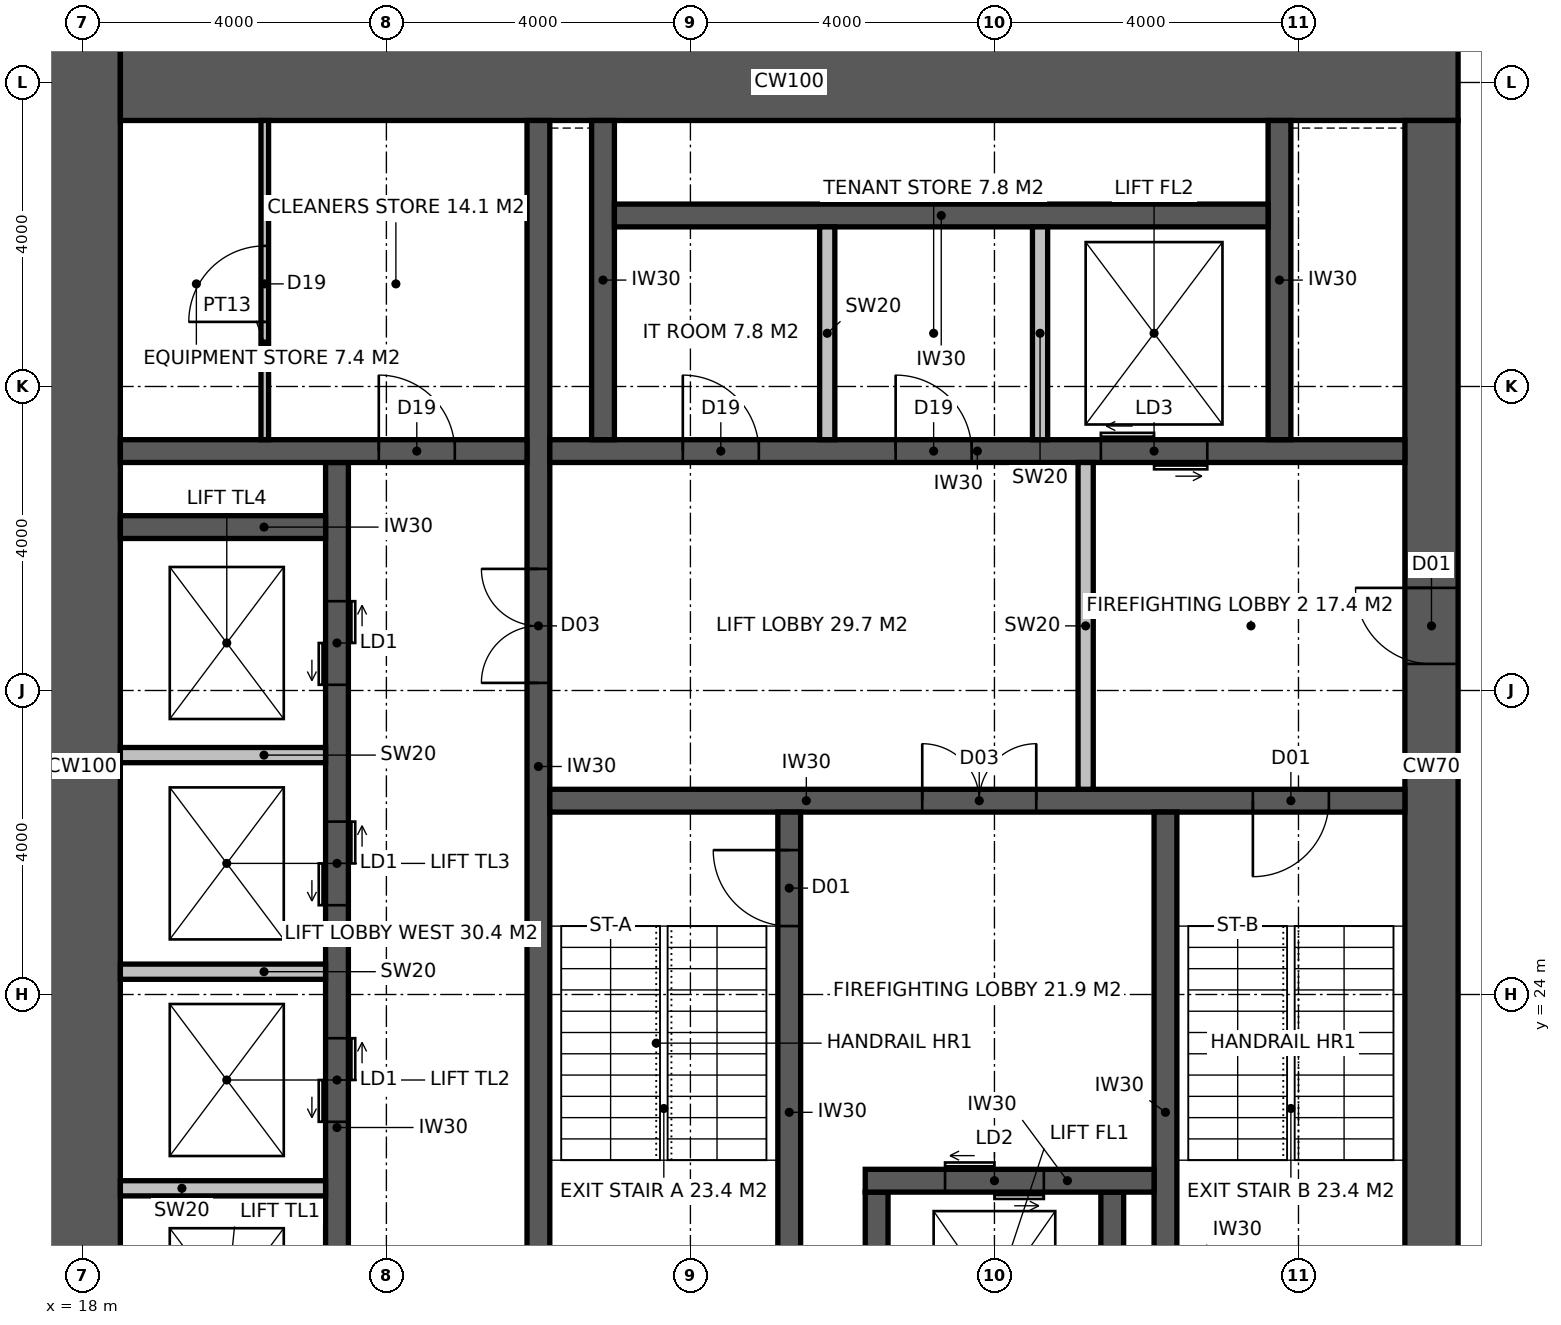
"""IFC4 building model, lengths in metres.
Left out: names, types, materials, properties, quantities, classifications, styles, units other than length and angle.
Written with IfcOpenShell. Run it as: python <this file> out.ifc"""

import sys

from ifc_helpers import new_model, si_unit, direction, frame, frame_2d, origin, place, context, subcontext, project, spatial, rectangle, extrude, element, fill, save


model = new_model("IFC4")
c1 = context("Model", 3, precision=1e-05, world=origin(), true_north=direction((0.0, 1.0)))
c2 = subcontext(c1, "Body", "Model", "MODEL_VIEW")
j1 = project(units=[si_unit("LENGTHUNIT", "METRE"), si_unit("PLANEANGLEUNIT", "RADIAN")], contexts=[c1])
p1 = place(None, origin())
s1 = spatial("IfcSite", under=j1, at=p1, CompositionType="ELEMENT")
p2 = place(p1, origin())
s2 = spatial("IfcBuilding", under=s1, at=p2, CompositionType="ELEMENT")
p3 = place(p2, frame((0.0, 0.0, 226.2)))
s3 = spatial("IfcBuildingStorey", under=s2, at=p3, CompositionType="ELEMENT", Elevation=226.2)
p4 = place(p3, frame((18.0, 17.5, -0.15), z_axis=(0.0, 0.0, 1.0), x_axis=(0.0, 1.0, 0.0)))
e1 = element("IfcWall", 1, at=p4, inside=s3, PredefinedType="SHEAR", context=c2, shape_type="SweptSolid", body=[
    extrude(rectangle(XDim=19.0, YDim=1.0, at=frame_2d((9.5, 0.0))), origin(), (0.0, 0.0, 1.0), 4.0),
])
p5 = place(p3, frame((18.5, 36.0, -0.15), z_axis=(0.0, 0.0, 1.0), x_axis=(1.0, 0.0, 0.0)))
e2 = element("IfcWall", 2, at=p5, inside=s3, PredefinedType="SHEAR", context=c2, shape_type="SweptSolid", body=[
    extrude(rectangle(XDim=17.6, YDim=1.0, at=frame_2d((8.8, 0.0))), origin(), (0.0, 0.0, 1.0), 4.0),
])
p6 = place(p3, frame((35.75, 18.5, -0.15), z_axis=(0.0, 0.0, 1.0), x_axis=(0.0, 1.0, 0.0)))
e3 = element("IfcWall", 3, at=p6, inside=s3, PredefinedType="SHEAR", context=c2, shape_type="SweptSolid", body=[
    extrude(rectangle(XDim=17.0, YDim=0.7, at=frame_2d((8.5, 0.0))), origin(), (0.0, 0.0, 1.0), 4.0),
])
p7 = place(p6, frame((9.85, 0.0, 0.15)))
e4 = element("IfcOpeningElement", 4, at=p7, cuts=e3, PredefinedType="OPENING", context=c2, shape_type="SweptSolid", body=[
    extrude(rectangle(XDim=1.0, YDim=2.2, at=frame_2d((0.5, 1.1))), frame((0.0, 0.36, 0.0), z_axis=(0.0, -1.0, 0.0), x_axis=(1.0, 0.0, 0.0)), (0.0, 0.0, 1.0), 0.72),
])
p8 = place(p3, frame((24.0, 18.5, -0.15), z_axis=(0.0, 0.0, 1.0), x_axis=(0.0, 1.0, 0.0)))
e5 = element("IfcWall", 5, at=p8, inside=s3, PredefinedType="SHEAR", context=c2, shape_type="SweptSolid", body=[
    extrude(rectangle(XDim=17.0, YDim=0.3, at=frame_2d((8.5, 0.0))), origin(), (0.0, 0.0, 1.0), 4.0),
])
p9 = place(p8, frame((9.6, 0.0, 0.15)))
e6 = element("IfcOpeningElement", 6, at=p9, cuts=e5, PredefinedType="OPENING", context=c2, shape_type="SweptSolid", body=[
    extrude(rectangle(XDim=1.5, YDim=2.4, at=frame_2d((0.75, 1.2))), frame((0.0, 0.16, 0.0), z_axis=(0.0, -1.0, 0.0), x_axis=(1.0, 0.0, 0.0)), (0.0, 0.0, 1.0), 0.32),
])
p10 = place(p3, frame((24.15, 26.55, -0.15), z_axis=(0.0, 0.0, 1.0), x_axis=(1.0, 0.0, 0.0)))
e7 = element("IfcWall", 7, at=p10, inside=s3, PredefinedType="SHEAR", context=c2, shape_type="SweptSolid", body=[
    extrude(rectangle(XDim=11.25, YDim=0.3, at=frame_2d((5.625, 0.0))), origin(), (0.0, 0.0, 1.0), 4.0),
])
p11 = place(p10, frame((9.25, 0.0, 0.15)))
e8 = element("IfcOpeningElement", 8, at=p11, cuts=e7, PredefinedType="OPENING", context=c2, shape_type="SweptSolid", body=[
    extrude(rectangle(XDim=1.0, YDim=2.2, at=frame_2d((0.5, 1.1))), frame((0.0, 0.16, 0.0), z_axis=(0.0, -1.0, 0.0), x_axis=(1.0, 0.0, 0.0)), (0.0, 0.0, 1.0), 0.32),
])
p12 = place(p10, frame((4.9, 0.0, 0.15)))
e9 = element("IfcOpeningElement", 9, at=p12, cuts=e7, PredefinedType="OPENING", context=c2, shape_type="SweptSolid", body=[
    extrude(rectangle(XDim=1.5, YDim=2.4, at=frame_2d((0.75, 1.2))), frame((0.0, 0.16, 0.0), z_axis=(0.0, -1.0, 0.0), x_axis=(1.0, 0.0, 0.0)), (0.0, 0.0, 1.0), 0.32),
])
p13 = place(p3, frame((27.3, 18.5, -0.15), z_axis=(0.0, 0.0, 1.0), x_axis=(0.0, 1.0, 0.0)))
e10 = element("IfcWall", 10, at=p13, inside=s3, PredefinedType="SHEAR", context=c2, shape_type="SweptSolid", body=[
    extrude(rectangle(XDim=7.9, YDim=0.3, at=frame_2d((3.95, 0.0))), origin(), (0.0, 0.0, 1.0), 4.0),
])
p14 = place(p13, frame((6.4, 0.0, 0.15)))
e11 = element("IfcOpeningElement", 11, at=p14, cuts=e10, PredefinedType="OPENING", context=c2, shape_type="SweptSolid", body=[
    extrude(rectangle(XDim=1.0, YDim=2.2, at=frame_2d((0.5, 1.1))), frame((0.0, 0.16, 0.0), z_axis=(0.0, -1.0, 0.0), x_axis=(1.0, 0.0, 0.0)), (0.0, 0.0, 1.0), 0.32),
])
p15 = place(p3, frame((32.25, 18.5, -0.15), z_axis=(0.0, 0.0, 1.0), x_axis=(0.0, 1.0, 0.0)))
e12 = element("IfcWall", 12, at=p15, inside=s3, PredefinedType="SHEAR", context=c2, shape_type="SweptSolid", body=[
    extrude(rectangle(XDim=7.9, YDim=0.3, at=frame_2d((3.95, 0.0))), origin(), (0.0, 0.0, 1.0), 4.0),
])
for number, where, z_axis, x_axis in (
    (13, (28.45, 18.5, -0.15), (0.0, 0.0, 1.0), (0.0, 1.0, 0.0)),
    (14, (31.55, 18.5, -0.15), (0.0, 0.0, 1.0), (0.0, 1.0, 0.0)),
):
    element("IfcWall", number, at=place(p3, frame(where, z_axis=z_axis, x_axis=x_axis)), inside=s3, PredefinedType="SHEAR", context=c2, shape_type="SweptSolid", body=[
        extrude(rectangle(XDim=2.9, YDim=0.3, at=frame_2d((1.45, 0.0))), origin(), (0.0, 0.0, 1.0), 4.0),
    ])
p16 = place(p3, frame((28.3, 21.55, -0.15), z_axis=(0.0, 0.0, 1.0), x_axis=(1.0, 0.0, 0.0)))
e15 = element("IfcWall", 15, at=p16, inside=s3, PredefinedType="SHEAR", context=c2, shape_type="SweptSolid", body=[
    extrude(rectangle(XDim=3.8, YDim=0.3, at=frame_2d((1.9, 0.0))), origin(), (0.0, 0.0, 1.0), 4.0),
])
p17 = place(p16, frame((1.05, 0.0, 0.15)))
e16 = element("IfcOpeningElement", 16, at=p17, cuts=e15, PredefinedType="OPENING", context=c2, shape_type="SweptSolid", body=[
    extrude(rectangle(XDim=1.3, YDim=2.4, at=frame_2d((0.65, 1.2))), frame((0.0, 0.16, 0.0), z_axis=(0.0, -1.0, 0.0), x_axis=(1.0, 0.0, 0.0)), (0.0, 0.0, 1.0), 0.32),
])
p18 = place(p3, frame((24.15, 31.15, -0.15), z_axis=(0.0, 0.0, 1.0), x_axis=(1.0, 0.0, 0.0)))
e17 = element("IfcWall", 17, at=p18, inside=s3, PredefinedType="SHEAR", context=c2, shape_type="SweptSolid", body=[
    extrude(rectangle(XDim=11.25, YDim=0.3, at=frame_2d((5.625, 0.0))), origin(), (0.0, 0.0, 1.0), 4.0),
])
p19 = place(p18, frame((1.75, 0.0, 0.15)))
e18 = element("IfcOpeningElement", 18, at=p19, cuts=e17, PredefinedType="OPENING", context=c2, shape_type="SweptSolid", body=[
    extrude(rectangle(XDim=1.0, YDim=2.2, at=frame_2d((0.5, 1.1))), frame((0.0, 0.16, 0.0), z_axis=(0.0, -1.0, 0.0), x_axis=(1.0, 0.0, 0.0)), (0.0, 0.0, 1.0), 0.32),
])
p20 = place(p18, frame((4.55, 0.0, 0.15)))
e19 = element("IfcOpeningElement", 19, at=p20, cuts=e17, PredefinedType="OPENING", context=c2, shape_type="SweptSolid", body=[
    extrude(rectangle(XDim=1.0, YDim=2.2, at=frame_2d((0.5, 1.1))), frame((0.0, 0.16, 0.0), z_axis=(0.0, -1.0, 0.0), x_axis=(1.0, 0.0, 0.0)), (0.0, 0.0, 1.0), 0.32),
])
p21 = place(p18, frame((7.25, 0.0, 0.15)))
e20 = element("IfcOpeningElement", 20, at=p21, cuts=e17, PredefinedType="OPENING", context=c2, shape_type="SweptSolid", body=[
    extrude(rectangle(XDim=1.4, YDim=2.4, at=frame_2d((0.7, 1.2))), frame((0.0, 0.16, 0.0), z_axis=(0.0, -1.0, 0.0), x_axis=(1.0, 0.0, 0.0)), (0.0, 0.0, 1.0), 0.32),
])
p22 = place(p3, frame((21.35, 18.5, -0.15), z_axis=(0.0, 0.0, 1.0), x_axis=(0.0, 1.0, 0.0)))
e21 = element("IfcWall", 21, at=p22, inside=s3, PredefinedType="SHEAR", context=c2, shape_type="SweptSolid", body=[
    extrude(rectangle(XDim=12.5, YDim=0.3, at=frame_2d((6.25, 0.0))), origin(), (0.0, 0.0, 1.0), 4.0),
])
p23 = place(p22, frame((0.875, 0.0, 0.15)))
e22 = element("IfcOpeningElement", 22, at=p23, cuts=e21, PredefinedType="OPENING", context=c2, shape_type="SweptSolid", body=[
    extrude(rectangle(XDim=1.1, YDim=2.2, at=frame_2d((0.55, 1.1))), frame((0.0, 0.16, 0.0), z_axis=(0.0, -1.0, 0.0), x_axis=(1.0, 0.0, 0.0)), (0.0, 0.0, 1.0), 0.32),
])
p24 = place(p22, frame((3.825, 0.0, 0.15)))
e23 = element("IfcOpeningElement", 23, at=p24, cuts=e21, PredefinedType="OPENING", context=c2, shape_type="SweptSolid", body=[
    extrude(rectangle(XDim=1.1, YDim=2.2, at=frame_2d((0.55, 1.1))), frame((0.0, 0.16, 0.0), z_axis=(0.0, -1.0, 0.0), x_axis=(1.0, 0.0, 0.0)), (0.0, 0.0, 1.0), 0.32),
])
p25 = place(p22, frame((6.675, 0.0, 0.15)))
e24 = element("IfcOpeningElement", 24, at=p25, cuts=e21, PredefinedType="OPENING", context=c2, shape_type="SweptSolid", body=[
    extrude(rectangle(XDim=1.1, YDim=2.2, at=frame_2d((0.55, 1.1))), frame((0.0, 0.16, 0.0), z_axis=(0.0, -1.0, 0.0), x_axis=(1.0, 0.0, 0.0)), (0.0, 0.0, 1.0), 0.32),
])
p26 = place(p22, frame((9.575, 0.0, 0.15)))
e25 = element("IfcOpeningElement", 25, at=p26, cuts=e21, PredefinedType="OPENING", context=c2, shape_type="SweptSolid", body=[
    extrude(rectangle(XDim=1.1, YDim=2.2, at=frame_2d((0.55, 1.1))), frame((0.0, 0.16, 0.0), z_axis=(0.0, -1.0, 0.0), x_axis=(1.0, 0.0, 0.0)), (0.0, 0.0, 1.0), 0.32),
])
p27 = place(p3, frame((18.5, 31.15, -0.15), z_axis=(0.0, 0.0, 1.0), x_axis=(1.0, 0.0, 0.0)))
e26 = element("IfcWall", 26, at=p27, inside=s3, PredefinedType="SHEAR", context=c2, shape_type="SweptSolid", body=[
    extrude(rectangle(XDim=5.35, YDim=0.3, at=frame_2d((2.675, 0.0))), origin(), (0.0, 0.0, 1.0), 4.0),
])
p28 = place(p27, frame((3.4, 0.0, 0.15)))
e27 = element("IfcOpeningElement", 27, at=p28, cuts=e26, PredefinedType="OPENING", context=c2, shape_type="SweptSolid", body=[
    extrude(rectangle(XDim=1.0, YDim=2.2, at=frame_2d((0.5, 1.1))), frame((0.0, 0.16, 0.0), z_axis=(0.0, -1.0, 0.0), x_axis=(1.0, 0.0, 0.0)), (0.0, 0.0, 1.0), 0.32),
])
p29 = place(p3, frame((18.5, 30.15, -0.15), z_axis=(0.0, 0.0, 1.0), x_axis=(1.0, 0.0, 0.0)))
e28 = element("IfcWall", 28, at=p29, inside=s3, PredefinedType="SHEAR", context=c2, shape_type="SweptSolid", body=[
    extrude(rectangle(XDim=2.7, YDim=0.3, at=frame_2d((1.35, 0.0))), origin(), (0.0, 0.0, 1.0), 4.0),
])
for number, where, z_axis, x_axis in (
    (29, (24.85, 31.3, -0.15), (0.0, 0.0, 1.0), (0.0, 1.0, 0.0)),
    (30, (33.75, 31.3, -0.15), (0.0, 0.0, 1.0), (0.0, 1.0, 0.0)),
):
    element("IfcWall", number, at=place(p3, frame(where, z_axis=z_axis, x_axis=x_axis)), inside=s3, PredefinedType="SHEAR", context=c2, shape_type="SweptSolid", body=[
        extrude(rectangle(XDim=4.2, YDim=0.3, at=frame_2d((2.1, 0.0))), origin(), (0.0, 0.0, 1.0), 4.0),
    ])
p30 = place(p3, frame((25.0, 34.25, -0.15), z_axis=(0.0, 0.0, 1.0), x_axis=(1.0, 0.0, 0.0)))
e31 = element("IfcWall", 31, at=p30, inside=s3, PredefinedType="SHEAR", context=c2, shape_type="SweptSolid", body=[
    extrude(rectangle(XDim=8.6, YDim=0.3, at=frame_2d((4.3, 0.0))), origin(), (0.0, 0.0, 1.0), 4.0),
])
p31 = place(p3, frame((27.8, 31.3, 0.0), z_axis=(0.0, 0.0, 1.0), x_axis=(0.0, 1.0, 0.0)))
e32 = element("IfcWall", 32, at=p31, inside=s3, PredefinedType="SOLIDWALL", context=c2, shape_type="SweptSolid", body=[
    extrude(rectangle(XDim=2.8, YDim=0.2, at=frame_2d((1.4, 0.0))), origin(), (0.0, 0.0, 1.0), 3.85),
])
p32 = place(p3, frame((30.6, 31.3, -0.15), z_axis=(0.0, 0.0, 1.0), x_axis=(0.0, 1.0, 0.0)))
e33 = element("IfcWall", 33, at=p32, inside=s3, PredefinedType="SOLIDWALL", context=c2, shape_type="SweptSolid", body=[
    extrude(rectangle(XDim=2.8, YDim=0.2, at=frame_2d((1.4, 0.0))), origin(), (0.0, 0.0, 1.0), 4.0),
])
for number, where, z_axis, x_axis in (
    (34, (18.5, 21.45, -0.15), (0.0, 0.0, 1.0), (1.0, 0.0, 0.0)),
    (35, (18.5, 24.3, -0.15), (0.0, 0.0, 1.0), (1.0, 0.0, 0.0)),
    (36, (18.5, 27.15, -0.15), (0.0, 0.0, 1.0), (1.0, 0.0, 0.0)),
):
    element("IfcWall", number, at=place(p3, frame(where, z_axis=z_axis, x_axis=x_axis)), inside=s3, PredefinedType="SOLIDWALL", context=c2, shape_type="SweptSolid", body=[
        extrude(rectangle(XDim=2.7, YDim=0.2, at=frame_2d((1.35, 0.0))), origin(), (0.0, 0.0, 1.0), 4.0),
    ])
p33 = place(p3, frame((31.2, 26.7, 0.0), z_axis=(0.0, 0.0, 1.0), x_axis=(0.0, 1.0, 0.0)))
e37 = element("IfcWall", 37, at=p33, inside=s3, PredefinedType="SOLIDWALL", context=c2, shape_type="SweptSolid", body=[
    extrude(rectangle(XDim=4.3, YDim=0.2, at=frame_2d((2.15, 0.0))), origin(), (0.0, 0.0, 1.0), 3.85),
])
p34 = place(p3, frame((20.4, 31.3, 0.0), z_axis=(0.0, 0.0, 1.0), x_axis=(0.0, 1.0, 0.0)))
e38 = element("IfcWall", 38, at=p34, inside=s3, PredefinedType="PARTITIONING", context=c2, shape_type="SweptSolid", body=[
    extrude(rectangle(XDim=4.2, YDim=0.1, at=frame_2d((2.1, 0.0))), origin(), (0.0, 0.0, 1.0), 3.85),
])
p35 = place(p34, frame((1.55, 0.0, 0.0)))
e39 = element("IfcOpeningElement", 39, at=p35, cuts=e38, PredefinedType="OPENING", context=c2, shape_type="SweptSolid", body=[
    extrude(rectangle(XDim=1.0, YDim=2.2, at=frame_2d((0.5, 1.1))), frame((0.0, 0.06, 0.0), z_axis=(0.0, -1.0, 0.0), x_axis=(1.0, 0.0, 0.0)), (0.0, 0.0, 1.0), 0.12),
])
p36 = place(p14, origin())
e40 = element("IfcDoor", 40, at=p36, inside=s3, OperationType="SINGLE_SWING_RIGHT", PredefinedType="DOOR", context=c2, shape_type="SweptSolid", body=[
    extrude(rectangle(XDim=1.0, YDim=2.2, at=frame_2d((0.5, 1.1))), frame((0.0, 0.025, 0.0), z_axis=(0.0, -1.0, 0.0), x_axis=(1.0, 0.0, 0.0)), (0.0, 0.0, 1.0), 0.05),
])
fill(e11, e40)
p37 = place(p11, frame((1.0, 0.0, 0.0), z_axis=(0.0, 0.0, 1.0), x_axis=(-1.0, 0.0, 0.0)))
e41 = element("IfcDoor", 41, at=p37, inside=s3, OperationType="SINGLE_SWING_RIGHT", PredefinedType="DOOR", context=c2, shape_type="SweptSolid", body=[
    extrude(rectangle(XDim=1.0, YDim=2.2, at=frame_2d((0.5, 1.1))), frame((0.0, 0.025, 0.0), z_axis=(0.0, -1.0, 0.0), x_axis=(1.0, 0.0, 0.0)), (0.0, 0.0, 1.0), 0.05),
])
fill(e8, e41)
p38 = place(p7, origin())
e42 = element("IfcDoor", 42, at=p38, inside=s3, OperationType="SINGLE_SWING_RIGHT", PredefinedType="DOOR", context=c2, shape_type="SweptSolid", body=[
    extrude(rectangle(XDim=1.0, YDim=2.2, at=frame_2d((0.5, 1.1))), frame((0.0, 0.025, 0.0), z_axis=(0.0, -1.0, 0.0), x_axis=(1.0, 0.0, 0.0)), (0.0, 0.0, 1.0), 0.05),
])
fill(e4, e42)
p39 = place(p12, origin())
e43 = element("IfcDoor", 43, at=p39, inside=s3, OperationType="DOUBLE_DOOR_DOUBLE_SWING", PredefinedType="DOOR", context=c2, shape_type="SweptSolid", body=[
    extrude(rectangle(XDim=1.5, YDim=2.4, at=frame_2d((0.75, 1.2))), frame((0.0, 0.025, 0.0), z_axis=(0.0, -1.0, 0.0), x_axis=(1.0, 0.0, 0.0)), (0.0, 0.0, 1.0), 0.05),
])
fill(e9, e43)
p40 = place(p9, origin())
e44 = element("IfcDoor", 44, at=p40, inside=s3, OperationType="DOUBLE_DOOR_DOUBLE_SWING", PredefinedType="DOOR", context=c2, shape_type="SweptSolid", body=[
    extrude(rectangle(XDim=1.5, YDim=2.4, at=frame_2d((0.75, 1.2))), frame((0.0, 0.025, 0.0), z_axis=(0.0, -1.0, 0.0), x_axis=(1.0, 0.0, 0.0)), (0.0, 0.0, 1.0), 0.05),
])
fill(e6, e44)
p41 = place(p28, origin())
e45 = element("IfcDoor", 45, at=p41, inside=s3, OperationType="SINGLE_SWING_LEFT", PredefinedType="DOOR", context=c2, shape_type="SweptSolid", body=[
    extrude(rectangle(XDim=1.0, YDim=2.2, at=frame_2d((0.5, 1.1))), frame((0.0, 0.025, 0.0), z_axis=(0.0, -1.0, 0.0), x_axis=(1.0, 0.0, 0.0)), (0.0, 0.0, 1.0), 0.05),
])
fill(e27, e45)
p42 = place(p35, origin())
e46 = element("IfcDoor", 46, at=p42, inside=s3, OperationType="SINGLE_SWING_LEFT", PredefinedType="DOOR", context=c2, shape_type="SweptSolid", body=[
    extrude(rectangle(XDim=1.0, YDim=2.2, at=frame_2d((0.5, 1.1))), frame((0.0, 0.025, 0.0), z_axis=(0.0, -1.0, 0.0), x_axis=(1.0, 0.0, 0.0)), (0.0, 0.0, 1.0), 0.05),
])
fill(e39, e46)
p43 = place(p19, origin())
e47 = element("IfcDoor", 47, at=p43, inside=s3, OperationType="SINGLE_SWING_LEFT", PredefinedType="DOOR", context=c2, shape_type="SweptSolid", body=[
    extrude(rectangle(XDim=1.0, YDim=2.2, at=frame_2d((0.5, 1.1))), frame((0.0, 0.025, 0.0), z_axis=(0.0, -1.0, 0.0), x_axis=(1.0, 0.0, 0.0)), (0.0, 0.0, 1.0), 0.05),
])
fill(e18, e47)
p44 = place(p20, origin())
e48 = element("IfcDoor", 48, at=p44, inside=s3, OperationType="SINGLE_SWING_LEFT", PredefinedType="DOOR", context=c2, shape_type="SweptSolid", body=[
    extrude(rectangle(XDim=1.0, YDim=2.2, at=frame_2d((0.5, 1.1))), frame((0.0, 0.025, 0.0), z_axis=(0.0, -1.0, 0.0), x_axis=(1.0, 0.0, 0.0)), (0.0, 0.0, 1.0), 0.05),
])
fill(e19, e48)
p45 = place(p17, origin())
e49 = element("IfcDoor", 49, at=p45, inside=s3, OperationType="DOUBLE_DOOR_SLIDING", PredefinedType="DOOR", context=c2, shape_type="SweptSolid", body=[
    extrude(rectangle(XDim=1.3, YDim=2.4, at=frame_2d((0.65, 1.2))), frame((0.0, 0.025, 0.0), z_axis=(0.0, -1.0, 0.0), x_axis=(1.0, 0.0, 0.0)), (0.0, 0.0, 1.0), 0.05),
])
fill(e16, e49)
p46 = place(p21, origin())
e50 = element("IfcDoor", 50, at=p46, inside=s3, OperationType="DOUBLE_DOOR_SLIDING", PredefinedType="DOOR", context=c2, shape_type="SweptSolid", body=[
    extrude(rectangle(XDim=1.4, YDim=2.4, at=frame_2d((0.7, 1.2))), frame((0.0, 0.025, 0.0), z_axis=(0.0, -1.0, 0.0), x_axis=(1.0, 0.0, 0.0)), (0.0, 0.0, 1.0), 0.05),
])
fill(e20, e50)
p47 = place(p24, origin())
e51 = element("IfcDoor", 51, at=p47, inside=s3, OperationType="DOUBLE_DOOR_SLIDING", PredefinedType="DOOR", context=c2, shape_type="SweptSolid", body=[
    extrude(rectangle(XDim=1.1, YDim=2.2, at=frame_2d((0.55, 1.1))), frame((0.0, 0.025, 0.0), z_axis=(0.0, -1.0, 0.0), x_axis=(1.0, 0.0, 0.0)), (0.0, 0.0, 1.0), 0.05),
])
fill(e23, e51)
p48 = place(p25, origin())
e52 = element("IfcDoor", 52, at=p48, inside=s3, OperationType="DOUBLE_DOOR_SLIDING", PredefinedType="DOOR", context=c2, shape_type="SweptSolid", body=[
    extrude(rectangle(XDim=1.1, YDim=2.2, at=frame_2d((0.55, 1.1))), frame((0.0, 0.025, 0.0), z_axis=(0.0, -1.0, 0.0), x_axis=(1.0, 0.0, 0.0)), (0.0, 0.0, 1.0), 0.05),
])
fill(e24, e52)
p49 = place(p26, origin())
e53 = element("IfcDoor", 53, at=p49, inside=s3, OperationType="DOUBLE_DOOR_SLIDING", PredefinedType="DOOR", context=c2, shape_type="SweptSolid", body=[
    extrude(rectangle(XDim=1.1, YDim=2.2, at=frame_2d((0.55, 1.1))), frame((0.0, 0.025, 0.0), z_axis=(0.0, -1.0, 0.0), x_axis=(1.0, 0.0, 0.0)), (0.0, 0.0, 1.0), 0.05),
])
fill(e25, e53)
save(model, sys.argv[1])
